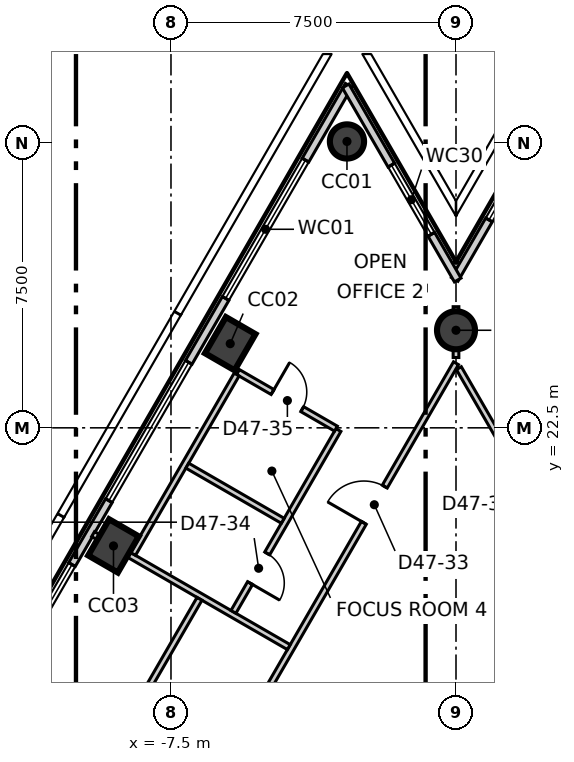
"""IFC4 building model, lengths in metres.
Left out: names, types, materials, properties, quantities, classifications, styles, units other than length and angle.
Written with IfcOpenShell. Run it as: python <this file> out.ifc"""

import sys

from ifc_helpers import new_model, si_unit, direction, frame, frame_2d, origin, origin_2d, place, context, subcontext, project, spatial, rectangle, circle, extrude, element, fill, save


model = new_model("IFC4")
c1 = context("Model", 3, precision=1e-05, world=origin(), true_north=direction((0.0, 1.0)))
c2 = subcontext(c1, "Body", "Model", "MODEL_VIEW")
j1 = project(units=[si_unit("LENGTHUNIT", "METRE"), si_unit("PLANEANGLEUNIT", "RADIAN")], contexts=[c1])
p1 = place(None, origin())
s1 = spatial("IfcSite", under=j1, at=p1, CompositionType="ELEMENT")
p2 = place(p1, origin())
s2 = spatial("IfcBuilding", under=s1, at=p2, CompositionType="ELEMENT")
p3 = place(p2, frame((0.0, 0.0, 203.3)))
s3 = spatial("IfcBuildingStorey", under=s2, at=p3, CompositionType="ELEMENT", Elevation=203.3)
p4 = place(p3, frame((-2.869, 30.035, -0.3), z_axis=(0.0, 0.0, 1.0), x_axis=(0.5, 0.866025403784, 0.0)))
e1 = element("IfcColumn", 1, at=p4, inside=s3, PredefinedType="COLUMN", context=c2, shape_type="SweptSolid", body=[
    extrude(circle(Radius=0.45, at=origin_2d()), origin(), (0.0, 0.0, 1.0), 4.0),
])
for number, where, z_axis, x_axis in (
    (2, (-5.941, 24.714, -0.3), (0.0, 0.0, 1.0), (0.5, 0.866, 0.0)),
    (3, (-9.013, 19.393, -0.3), (0.0, 0.0, 1.0), (0.5, 0.866, 0.0)),
):
    element("IfcColumn", number, at=place(p3, frame(where, z_axis=z_axis, x_axis=x_axis)), inside=s3, PredefinedType="COLUMN", context=c2, shape_type="SweptSolid", body=[
        extrude(rectangle(XDim=1.1, YDim=0.9, at=origin_2d()), origin(), (0.0, 0.0, 1.0), 4.0),
    ])
p5 = place(p3, frame((0.0, 25.067, -0.3), z_axis=(0.0, 0.0, 1.0), x_axis=(1.0, 0.0, 0.0)))
e4 = element("IfcColumn", 4, at=p5, inside=s3, PredefinedType="COLUMN", context=c2, shape_type="SweptSolid", body=[
    extrude(circle(Radius=0.5, at=origin_2d()), origin(), (0.0, 0.0, 1.0), 4.0),
])
p6 = place(p3, frame((-2.824, 31.513, 0.0), z_axis=(0.0, 0.0, 1.0), x_axis=(-0.500012324412, -0.866018288165, 0.0)))
e5 = element("IfcWall", 5, at=p6, inside=s3, PredefinedType="ELEMENTEDWALL", context=c2, shape_type="SweptSolid", body=[
    extrude(rectangle(XDim=51.739, YDim=0.2, at=frame_2d((25.87, 0.0))), origin(), (0.0, 0.0, 1.0), 3.7),
])
p7 = place(p6, frame((2.275, 0.0, 0.9)))
e6 = element("IfcOpeningElement", 6, at=p7, cuts=e5, PredefinedType="OPENING", context=c2, shape_type="SweptSolid", body=[
    extrude(rectangle(XDim=4.2, YDim=2.5, at=frame_2d((2.1, 1.25))), frame((0.0, 0.11, 0.0), z_axis=(0.0, -1.0, 0.0), x_axis=(1.0, 0.0, 0.0)), (0.0, 0.0, 1.0), 0.22),
])
p8 = place(p6, frame((8.419, 0.0, 0.9)))
e7 = element("IfcOpeningElement", 7, at=p8, cuts=e5, PredefinedType="OPENING", context=c2, shape_type="SweptSolid", body=[
    extrude(rectangle(XDim=4.2, YDim=2.5, at=frame_2d((2.1, 1.25))), frame((0.0, 0.11, 0.0), z_axis=(0.0, -1.0, 0.0), x_axis=(1.0, 0.0, 0.0)), (0.0, 0.0, 1.0), 0.22),
])
p9 = place(p6, frame((14.563, 0.0, 0.9)))
e8 = element("IfcOpeningElement", 8, at=p9, cuts=e5, PredefinedType="OPENING", context=c2, shape_type="SweptSolid", body=[
    extrude(rectangle(XDim=4.2, YDim=2.5, at=frame_2d((2.1, 1.25))), frame((0.0, 0.11, 0.0), z_axis=(0.0, -1.0, 0.0), x_axis=(1.0, 0.0, 0.0)), (0.0, 0.0, 1.0), 0.22),
])
p10 = place(p6, frame((20.707, 0.0, 0.9)))
e9 = element("IfcOpeningElement", 9, at=p10, cuts=e5, PredefinedType="OPENING", context=c2, shape_type="SweptSolid", body=[
    extrude(rectangle(XDim=4.2, YDim=2.5, at=frame_2d((2.1, 1.25))), frame((0.0, 0.11, 0.0), z_axis=(0.0, -1.0, 0.0), x_axis=(1.0, 0.0, 0.0)), (0.0, 0.0, 1.0), 0.22),
])
p11 = place(p6, frame((26.851, 0.0, 0.9)))
e10 = element("IfcOpeningElement", 10, at=p11, cuts=e5, PredefinedType="OPENING", context=c2, shape_type="SweptSolid", body=[
    extrude(rectangle(XDim=4.2, YDim=2.5, at=frame_2d((2.1, 1.25))), frame((0.0, 0.11, 0.0), z_axis=(0.0, -1.0, 0.0), x_axis=(1.0, 0.0, 0.0)), (0.0, 0.0, 1.0), 0.22),
])
p12 = place(p6, frame((32.995, 0.0, 0.9)))
e11 = element("IfcOpeningElement", 11, at=p12, cuts=e5, PredefinedType="OPENING", context=c2, shape_type="SweptSolid", body=[
    extrude(rectangle(XDim=4.2, YDim=2.5, at=frame_2d((2.1, 1.25))), frame((0.0, 0.11, 0.0), z_axis=(0.0, -1.0, 0.0), x_axis=(1.0, 0.0, 0.0)), (0.0, 0.0, 1.0), 0.22),
])
p13 = place(p6, frame((39.14, 0.0, 0.9)))
e12 = element("IfcOpeningElement", 12, at=p13, cuts=e5, PredefinedType="OPENING", context=c2, shape_type="SweptSolid", body=[
    extrude(rectangle(XDim=4.2, YDim=2.5, at=frame_2d((2.1, 1.25))), frame((0.0, 0.11, 0.0), z_axis=(0.0, -1.0, 0.0), x_axis=(1.0, 0.0, 0.0)), (0.0, 0.0, 1.0), 0.22),
])
p14 = place(p6, frame((45.284, 0.0, 0.9)))
e13 = element("IfcOpeningElement", 13, at=p14, cuts=e5, PredefinedType="OPENING", context=c2, shape_type="SweptSolid", body=[
    extrude(rectangle(XDim=4.2, YDim=2.5, at=frame_2d((2.1, 1.25))), frame((0.0, 0.11, 0.0), z_axis=(0.0, -1.0, 0.0), x_axis=(1.0, 0.0, 0.0)), (0.0, 0.0, 1.0), 0.22),
])
p15 = place(p3, frame((2.914, 31.513, 0.0), z_axis=(0.0, 0.0, 1.0), x_axis=(-0.500061696128, -0.865989780578, 0.0)))
e14 = element("IfcWall", 14, at=p15, inside=s3, PredefinedType="ELEMENTEDWALL", context=c2, shape_type="SweptSolid", body=[
    extrude(rectangle(XDim=5.897, YDim=0.2, at=frame_2d((2.949, 0.0))), origin(), (0.0, 0.0, 1.0), 3.7),
])
p16 = place(p15, frame((1.99, 0.0, 0.9)))
e15 = element("IfcOpeningElement", 15, at=p16, cuts=e14, PredefinedType="OPENING", context=c2, shape_type="SweptSolid", body=[
    extrude(rectangle(XDim=2.1, YDim=2.5, at=frame_2d((1.05, 1.25))), frame((0.0, 0.11, 0.0), z_axis=(0.0, -1.0, 0.0), x_axis=(1.0, 0.0, 0.0)), (0.0, 0.0, 1.0), 0.22),
])
p17 = place(p3, frame((0.045, 26.389, 0.0), z_axis=(0.0, 0.0, 1.0), x_axis=(-0.500043768782, 0.866000132391, 0.0)))
e16 = element("IfcWall", 16, at=p17, inside=s3, PredefinedType="ELEMENTEDWALL", context=c2, shape_type="SweptSolid", body=[
    extrude(rectangle(XDim=5.897, YDim=0.2, at=frame_2d((2.949, 0.0))), origin(), (0.0, 0.0, 1.0), 3.7),
])
p18 = place(p17, frame((1.39, 0.0, 0.9)))
e17 = element("IfcOpeningElement", 17, at=p18, cuts=e16, PredefinedType="OPENING", context=c2, shape_type="SweptSolid", body=[
    extrude(rectangle(XDim=2.1, YDim=2.5, at=frame_2d((1.05, 1.25))), frame((0.0, 0.11, 0.0), z_axis=(0.0, -1.0, 0.0), x_axis=(1.0, 0.0, 0.0)), (0.0, 0.0, 1.0), 0.22),
])
p19 = place(p3, frame((-20.883, -11.97, 0.0), z_axis=(0.0, 0.0, 1.0), x_axis=(0.500006150555, 0.866021852731, 0.0)))
e18 = element("IfcWall", 18, at=p19, inside=s3, PredefinedType="PARTITIONING", context=c2, shape_type="SweptSolid", body=[
    extrude(rectangle(XDim=41.766, YDim=0.15, at=frame_2d((20.883, 0.0))), origin(), (0.0, 0.0, 1.0), 3.7),
])
p20 = place(p19, frame((36.916, 0.0, 0.0)))
e19 = element("IfcOpeningElement", 19, at=p20, cuts=e18, PredefinedType="OPENING", context=c2, shape_type="SweptSolid", body=[
    extrude(rectangle(XDim=1.1, YDim=2.1, at=frame_2d((0.55, 1.05))), frame((0.0, 0.085, 0.0), z_axis=(0.0, -1.0, 0.0), x_axis=(1.0, 0.0, 0.0)), (0.0, 0.0, 1.0), 0.17),
])
p21 = place(p19, frame((26.446, 0.0, 0.0)))
e20 = element("IfcOpeningElement", 20, at=p21, cuts=e18, PredefinedType="OPENING", context=c2, shape_type="SweptSolid", body=[
    extrude(rectangle(XDim=1.1, YDim=2.1, at=frame_2d((0.55, 1.05))), frame((0.0, 0.085, 0.0), z_axis=(0.0, -1.0, 0.0), x_axis=(1.0, 0.0, 0.0)), (0.0, 0.0, 1.0), 0.17),
])
p22 = place(p19, frame((9.757, 0.0, 0.0)))
e21 = element("IfcOpeningElement", 21, at=p22, cuts=e18, PredefinedType="OPENING", context=c2, shape_type="SweptSolid", body=[
    extrude(rectangle(XDim=1.1, YDim=2.1, at=frame_2d((0.55, 1.05))), frame((0.0, 0.085, 0.0), z_axis=(0.0, -1.0, 0.0), x_axis=(1.0, 0.0, 0.0)), (0.0, 0.0, 1.0), 0.17),
])
p23 = place(p19, frame((18.757, 0.0, 0.0)))
e22 = element("IfcOpeningElement", 22, at=p23, cuts=e18, PredefinedType="OPENING", context=c2, shape_type="SweptSolid", body=[
    extrude(rectangle(XDim=0.9, YDim=2.1, at=frame_2d((0.45, 1.05))), frame((0.0, 0.085, 0.0), z_axis=(0.0, -1.0, 0.0), x_axis=(1.0, 0.0, 0.0)), (0.0, 0.0, 1.0), 0.17),
])
p24 = place(p19, frame((15.557, 0.0, 0.0)))
e23 = element("IfcOpeningElement", 23, at=p24, cuts=e18, PredefinedType="OPENING", context=c2, shape_type="SweptSolid", body=[
    extrude(rectangle(XDim=0.9, YDim=2.1, at=frame_2d((0.45, 1.05))), frame((0.0, 0.085, 0.0), z_axis=(0.0, -1.0, 0.0), x_axis=(1.0, 0.0, 0.0)), (0.0, 0.0, 1.0), 0.17),
])
p25 = place(p19, frame((12.657, 0.0, 0.0)))
e24 = element("IfcOpeningElement", 24, at=p25, cuts=e18, PredefinedType="OPENING", context=c2, shape_type="SweptSolid", body=[
    extrude(rectangle(XDim=1.0, YDim=2.1, at=frame_2d((0.5, 1.05))), frame((0.0, 0.085, 0.0), z_axis=(0.0, -1.0, 0.0), x_axis=(1.0, 0.0, 0.0)), (0.0, 0.0, 1.0), 0.17),
])
p26 = place(p19, frame((3.669, 0.0, 0.0)))
e25 = element("IfcOpeningElement", 25, at=p26, cuts=e18, PredefinedType="OPENING", context=c2, shape_type="SweptSolid", body=[
    extrude(rectangle(XDim=1.1, YDim=2.1, at=frame_2d((0.55, 1.05))), frame((0.0, 0.085, 0.0), z_axis=(0.0, -1.0, 0.0), x_axis=(1.0, 0.0, 0.0)), (0.0, 0.0, 1.0), 0.17),
])
p27 = place(p3, frame((-9.55, 19.703, 0.0), z_axis=(0.0, 0.0, 1.0), x_axis=(0.866064581528, -0.499932136017, 0.0)))
e26 = element("IfcWall", 26, at=p27, inside=s3, PredefinedType="PARTITIONING", context=c2, shape_type="SweptSolid", body=[
    extrude(rectangle(XDim=5.947, YDim=0.15, at=frame_2d((2.973, 0.0))), origin(), (0.0, 0.0, 1.0), 3.7),
])
p28 = place(p3, frame((0.0, 24.35, 0.0), z_axis=(0.0, 0.0, 1.0), x_axis=(0.0, 1.0, 0.0)))
e27 = element("IfcWall", 27, at=p28, inside=s3, PredefinedType="PARTITIONING", context=c2, shape_type="SweptSolid", body=[
    extrude(rectangle(XDim=1.337, YDim=0.15, at=frame_2d((0.668, 0.0))), origin(), (0.0, 0.0, 1.0), 3.2),
])
p29 = place(p3, frame((0.075, 24.07, 0.0), z_axis=(0.0, 0.0, 1.0), x_axis=(0.500006834213, -0.866021458014, 0.0)))
e28 = element("IfcWall", 28, at=p29, inside=s3, PredefinedType="PARTITIONING", context=c2, shape_type="SweptSolid", body=[
    extrude(rectangle(XDim=41.616, YDim=0.15, at=frame_2d((20.808, 0.0))), origin(), (0.0, 0.0, 1.0), 3.7),
])
p30 = place(p29, frame((36.915, 0.0, 0.0)))
e29 = element("IfcOpeningElement", 29, at=p30, cuts=e28, PredefinedType="OPENING", context=c2, shape_type="SweptSolid", body=[
    extrude(rectangle(XDim=1.1, YDim=2.1, at=frame_2d((0.55, 1.05))), frame((0.0, 0.085, 0.0), z_axis=(0.0, -1.0, 0.0), x_axis=(1.0, 0.0, 0.0)), (0.0, 0.0, 1.0), 0.17),
])
p31 = place(p29, frame((22.046, 0.0, 0.0)))
e30 = element("IfcOpeningElement", 30, at=p31, cuts=e28, PredefinedType="OPENING", context=c2, shape_type="SweptSolid", body=[
    extrude(rectangle(XDim=1.1, YDim=2.1, at=frame_2d((0.55, 1.05))), frame((0.0, 0.085, 0.0), z_axis=(0.0, -1.0, 0.0), x_axis=(1.0, 0.0, 0.0)), (0.0, 0.0, 1.0), 0.17),
])
p32 = place(p29, frame((31.046, 0.0, 0.0)))
e31 = element("IfcOpeningElement", 31, at=p32, cuts=e28, PredefinedType="OPENING", context=c2, shape_type="SweptSolid", body=[
    extrude(rectangle(XDim=0.9, YDim=2.1, at=frame_2d((0.45, 1.05))), frame((0.0, 0.085, 0.0), z_axis=(0.0, -1.0, 0.0), x_axis=(1.0, 0.0, 0.0)), (0.0, 0.0, 1.0), 0.17),
])
p33 = place(p29, frame((27.846, 0.0, 0.0)))
e32 = element("IfcOpeningElement", 32, at=p33, cuts=e28, PredefinedType="OPENING", context=c2, shape_type="SweptSolid", body=[
    extrude(rectangle(XDim=0.9, YDim=2.1, at=frame_2d((0.45, 1.05))), frame((0.0, 0.085, 0.0), z_axis=(0.0, -1.0, 0.0), x_axis=(1.0, 0.0, 0.0)), (0.0, 0.0, 1.0), 0.17),
])
p34 = place(p29, frame((24.946, 0.0, 0.0)))
e33 = element("IfcOpeningElement", 33, at=p34, cuts=e28, PredefinedType="OPENING", context=c2, shape_type="SweptSolid", body=[
    extrude(rectangle(XDim=1.0, YDim=2.1, at=frame_2d((0.5, 1.05))), frame((0.0, 0.085, 0.0), z_axis=(0.0, -1.0, 0.0), x_axis=(1.0, 0.0, 0.0)), (0.0, 0.0, 1.0), 0.17),
])
p35 = place(p29, frame((17.258, 0.0, 0.0)))
e34 = element("IfcOpeningElement", 34, at=p35, cuts=e28, PredefinedType="OPENING", context=c2, shape_type="SweptSolid", body=[
    extrude(rectangle(XDim=1.0, YDim=2.1, at=frame_2d((0.5, 1.05))), frame((0.0, 0.085, 0.0), z_axis=(0.0, -1.0, 0.0), x_axis=(1.0, 0.0, 0.0)), (0.0, 0.0, 1.0), 0.17),
])
p36 = place(p29, frame((11.114, 0.0, 0.0)))
e35 = element("IfcOpeningElement", 35, at=p36, cuts=e28, PredefinedType="OPENING", context=c2, shape_type="SweptSolid", body=[
    extrude(rectangle(XDim=1.0, YDim=2.1, at=frame_2d((0.5, 1.05))), frame((0.0, 0.085, 0.0), z_axis=(0.0, -1.0, 0.0), x_axis=(1.0, 0.0, 0.0)), (0.0, 0.0, 1.0), 0.17),
])
p37 = place(p29, frame((3.669, 0.0, 0.0)))
e36 = element("IfcOpeningElement", 36, at=p37, cuts=e28, PredefinedType="OPENING", context=c2, shape_type="SweptSolid", body=[
    extrude(rectangle(XDim=1.0, YDim=2.1, at=frame_2d((0.5, 1.05))), frame((0.0, 0.085, 0.0), z_axis=(0.0, -1.0, 0.0), x_axis=(1.0, 0.0, 0.0)), (0.0, 0.0, 1.0), 0.17),
])
p38 = place(p3, frame((-12.82, 7.488, 0.0), z_axis=(0.0, 0.0, 1.0), x_axis=(0.500060781096, 0.865990308958, 0.0)))
e37 = element("IfcWall", 37, at=p38, inside=s3, PredefinedType="PARTITIONING", context=c2, shape_type="SweptSolid", body=[
    extrude(rectangle(XDim=12.139, YDim=0.15, at=frame_2d((6.069, 0.0))), origin(), (0.0, 0.0, 1.0), 3.7),
])
p39 = place(p38, frame((5.564, 0.0, 0.0)))
e38 = element("IfcOpeningElement", 38, at=p39, cuts=e37, PredefinedType="OPENING", context=c2, shape_type="SweptSolid", body=[
    extrude(rectangle(XDim=1.0, YDim=2.1, at=frame_2d((0.5, 1.05))), frame((0.0, 0.085, 0.0), z_axis=(0.0, -1.0, 0.0), x_axis=(1.0, 0.0, 0.0)), (0.0, 0.0, 1.0), 0.17),
])
p40 = place(p3, frame((-5.856, 17.657, 0.0), z_axis=(0.0, 0.0, 1.0), x_axis=(0.499917542299, 0.866073005526, 0.0)))
e39 = element("IfcWall", 39, at=p40, inside=s3, PredefinedType="PARTITIONING", context=c2, shape_type="SweptSolid", body=[
    extrude(rectangle(XDim=5.525, YDim=0.15, at=frame_2d((2.762, 0.0))), origin(), (0.0, 0.0, 1.0), 3.7),
])
p41 = place(p40, frame((0.875, 0.0, 0.0)))
e40 = element("IfcOpeningElement", 40, at=p41, cuts=e39, PredefinedType="OPENING", context=c2, shape_type="SweptSolid", body=[
    extrude(rectangle(XDim=0.9, YDim=2.1, at=frame_2d((0.45, 1.05))), frame((0.0, 0.085, 0.0), z_axis=(0.0, -1.0, 0.0), x_axis=(1.0, 0.0, 0.0)), (0.0, 0.0, 1.0), 0.17),
])
p42 = place(p3, frame((-5.736, 23.967, 0.0), z_axis=(0.0, 0.0, 1.0), x_axis=(0.866007976609, -0.500030183538, 0.0)))
e41 = element("IfcWall", 41, at=p42, inside=s3, PredefinedType="PARTITIONING", context=c2, shape_type="SweptSolid", body=[
    extrude(rectangle(XDim=2.976, YDim=0.15, at=frame_2d((1.488, 0.0))), origin(), (0.0, 0.0, 1.0), 3.7),
])
p43 = place(p42, frame((1.05, 0.0, 0.0)))
e42 = element("IfcOpeningElement", 42, at=p43, cuts=e41, PredefinedType="OPENING", context=c2, shape_type="SweptSolid", body=[
    extrude(rectangle(XDim=0.9, YDim=2.1, at=frame_2d((0.45, 1.05))), frame((0.0, 0.085, 0.0), z_axis=(0.0, -1.0, 0.0), x_axis=(1.0, 0.0, 0.0)), (0.0, 0.0, 1.0), 0.17),
])
p44 = place(p3, frame((-8.498, 19.182, 0.0), z_axis=(0.0, 0.0, 1.0), x_axis=(0.499983534837, 0.866034909742, 0.0)))
e43 = element("IfcWall", 43, at=p44, inside=s3, PredefinedType="PARTITIONING", context=c2, shape_type="SweptSolid", body=[
    extrude(rectangle(XDim=5.45, YDim=0.15, at=frame_2d((2.725, 0.0))), origin(), (0.0, 0.0, 1.0), 3.7),
])
p45 = place(p3, frame((-7.071, 21.505, 0.0), z_axis=(0.0, 0.0, 1.0), x_axis=(0.865929066901, -0.500166823267, 0.0)))
e44 = element("IfcWall", 44, at=p45, inside=s3, PredefinedType="PARTITIONING", context=c2, shape_type="SweptSolid", body=[
    extrude(rectangle(XDim=2.901, YDim=0.15, at=frame_2d((1.45, 0.0))), origin(), (0.0, 0.0, 1.0), 3.7),
])
p46 = place(p7, origin())
e45 = element("IfcWindow", 45, at=p46, inside=s3, PartitioningType="SINGLE_PANEL", PredefinedType="WINDOW", context=c2, shape_type="SweptSolid", body=[
    extrude(rectangle(XDim=4.2, YDim=2.5, at=frame_2d((2.1, 1.25))), frame((0.0, 0.03, 0.0), z_axis=(0.0, -1.0, 0.0), x_axis=(1.0, 0.0, 0.0)), (0.0, 0.0, 1.0), 0.06),
])
fill(e6, e45)
p47 = place(p8, origin())
e46 = element("IfcWindow", 46, at=p47, inside=s3, PartitioningType="SINGLE_PANEL", PredefinedType="WINDOW", context=c2, shape_type="SweptSolid", body=[
    extrude(rectangle(XDim=4.2, YDim=2.5, at=frame_2d((2.1, 1.25))), frame((0.0, 0.03, 0.0), z_axis=(0.0, -1.0, 0.0), x_axis=(1.0, 0.0, 0.0)), (0.0, 0.0, 1.0), 0.06),
])
fill(e7, e46)
p48 = place(p9, origin())
e47 = element("IfcWindow", 47, at=p48, inside=s3, PartitioningType="SINGLE_PANEL", PredefinedType="WINDOW", context=c2, shape_type="SweptSolid", body=[
    extrude(rectangle(XDim=4.2, YDim=2.5, at=frame_2d((2.1, 1.25))), frame((0.0, 0.03, 0.0), z_axis=(0.0, -1.0, 0.0), x_axis=(1.0, 0.0, 0.0)), (0.0, 0.0, 1.0), 0.06),
])
fill(e8, e47)
p49 = place(p16, origin())
e48 = element("IfcWindow", 48, at=p49, inside=s3, PartitioningType="SINGLE_PANEL", PredefinedType="WINDOW", context=c2, shape_type="SweptSolid", body=[
    extrude(rectangle(XDim=2.1, YDim=2.5, at=frame_2d((1.05, 1.25))), frame((0.0, 0.03, 0.0), z_axis=(0.0, -1.0, 0.0), x_axis=(1.0, 0.0, 0.0)), (0.0, 0.0, 1.0), 0.06),
])
fill(e15, e48)
p50 = place(p18, origin())
e49 = element("IfcWindow", 49, at=p50, inside=s3, PartitioningType="SINGLE_PANEL", PredefinedType="WINDOW", context=c2, shape_type="SweptSolid", body=[
    extrude(rectangle(XDim=2.1, YDim=2.5, at=frame_2d((1.05, 1.25))), frame((0.0, 0.03, 0.0), z_axis=(0.0, -1.0, 0.0), x_axis=(1.0, 0.0, 0.0)), (0.0, 0.0, 1.0), 0.06),
])
fill(e17, e49)
p51 = place(p20, origin())
e50 = element("IfcDoor", 50, at=p51, inside=s3, OperationType="SINGLE_SWING_RIGHT", PredefinedType="DOOR", context=c2, shape_type="SweptSolid", body=[
    extrude(rectangle(XDim=1.1, YDim=2.1, at=frame_2d((0.55, 1.05))), frame((0.0, 0.025, 0.0), z_axis=(0.0, -1.0, 0.0), x_axis=(1.0, 0.0, 0.0)), (0.0, 0.0, 1.0), 0.05),
])
fill(e19, e50)
p52 = place(p41, origin())
e51 = element("IfcDoor", 51, at=p52, inside=s3, OperationType="SINGLE_SWING_LEFT", PredefinedType="DOOR", context=c2, shape_type="SweptSolid", body=[
    extrude(rectangle(XDim=0.9, YDim=2.1, at=frame_2d((0.45, 1.05))), frame((0.0, 0.025, 0.0), z_axis=(0.0, -1.0, 0.0), x_axis=(1.0, 0.0, 0.0)), (0.0, 0.0, 1.0), 0.05),
])
fill(e40, e51)
p53 = place(p43, origin())
e52 = element("IfcDoor", 52, at=p53, inside=s3, OperationType="SINGLE_SWING_RIGHT", PredefinedType="DOOR", context=c2, shape_type="SweptSolid", body=[
    extrude(rectangle(XDim=0.9, YDim=2.1, at=frame_2d((0.45, 1.05))), frame((0.0, 0.025, 0.0), z_axis=(0.0, -1.0, 0.0), x_axis=(1.0, 0.0, 0.0)), (0.0, 0.0, 1.0), 0.05),
])
fill(e42, e52)
save(model, sys.argv[1])
